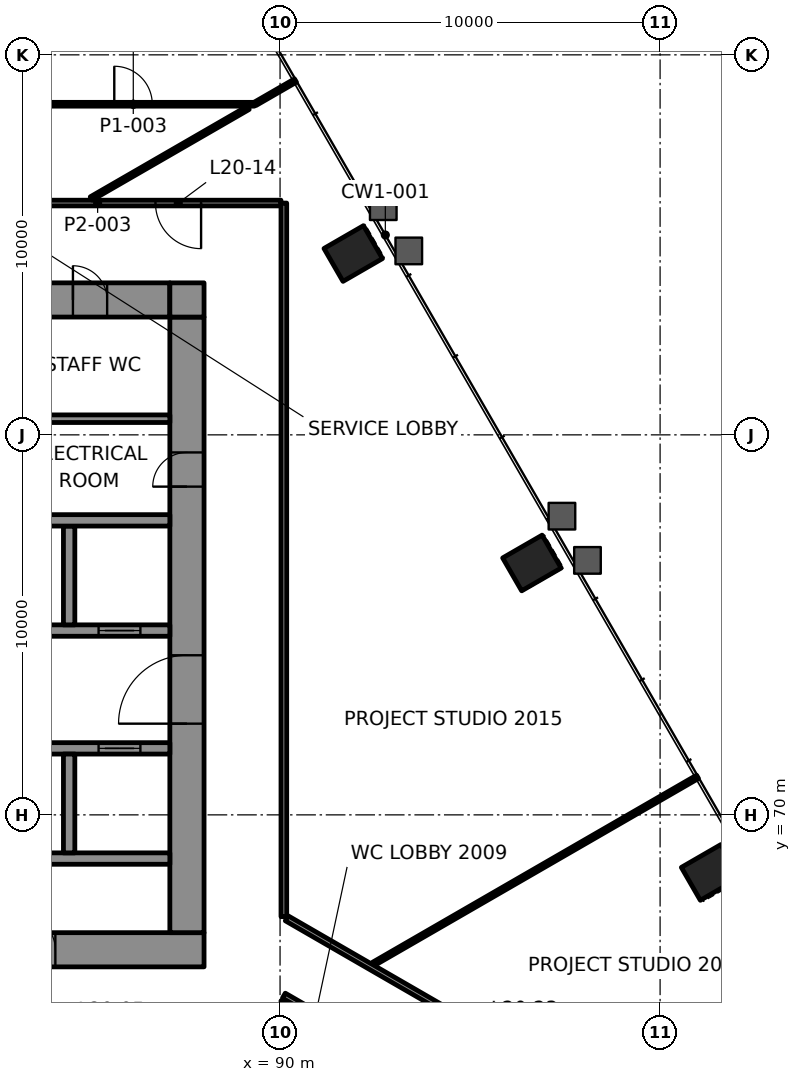
"""IFC4 building model, lengths in metres.
Left out: names, types, materials, properties, quantities, classifications, styles, units other than length and angle.
Written with IfcOpenShell. Run it as: python <this file> out.ifc"""

import sys

from ifc_helpers import new_model, si_unit, direction, frame, frame_2d, origin, origin_2d, place, context, subcontext, project, spatial, rectangle, extrude, element, fill, save


model = new_model("IFC4")
c1 = context("Model", 3, precision=1e-05, world=origin(), true_north=direction((0.0, 1.0)))
c2 = subcontext(c1, "Body", "Model", "MODEL_VIEW")
j1 = project(units=[si_unit("LENGTHUNIT", "METRE"), si_unit("PLANEANGLEUNIT", "RADIAN")], contexts=[c1])
p1 = place(None, origin())
s1 = spatial("IfcSite", under=j1, at=p1, CompositionType="ELEMENT")
p2 = place(p1, origin())
s2 = spatial("IfcBuilding", under=s1, at=p2, CompositionType="ELEMENT")
p3 = place(p2, frame((0.0, 0.0, 90.4)))
s3 = spatial("IfcBuildingStorey", under=s2, at=p3, CompositionType="ELEMENT", Elevation=90.4)
for number, where, z_axis, x_axis in (
    (1, (101.329, 68.485, -0.0), (0.0, 0.0, 1.0), (-0.5, 0.866, 0.0)),
    (2, (96.627, 76.628, -0.0), (0.0, 0.0, 1.0), (-0.5, 0.866, 0.0)),
    (3, (91.926, 84.772, -0.0), (0.0, 0.0, 1.0), (-0.5, 0.866, 0.0)),
):
    element("IfcColumn", number, at=place(p3, frame(where, z_axis=z_axis, x_axis=x_axis)), inside=s3, PredefinedType="COLUMN", context=c2, shape_type="SweptSolid", body=[
        extrude(rectangle(XDim=1.0, YDim=1.2, at=origin_2d()), origin(), (0.0, 0.0, 1.0), 4.2),
    ])
p4 = place(p3, frame((62.0, 66.45, 0.0), z_axis=(0.0, 0.0, 1.0), x_axis=(1.0, 0.0, 0.0)))
e4 = element("IfcWall", 4, at=p4, inside=s3, PredefinedType="SHEAR", context=c2, shape_type="SweptSolid", body=[
    extrude(rectangle(XDim=26.0, YDim=0.9, at=frame_2d((13.0, 0.0))), origin(), (0.0, 0.0, 1.0), 4.0),
])
p5 = place(p4, frame((3.45, 0.0, 0.0)))
e5 = element("IfcOpeningElement", 5, at=p5, cuts=e4, PredefinedType="OPENING", context=c2, shape_type="SweptSolid", body=[
    extrude(rectangle(XDim=0.9, YDim=2.1, at=frame_2d((0.45, 1.05))), frame((0.0, 0.46, 0.0), z_axis=(0.0, -1.0, 0.0), x_axis=(1.0, 0.0, 0.0)), (0.0, 0.0, 1.0), 0.92),
])
p6 = place(p4, frame((6.425, 0.0, 0.0)))
e6 = element("IfcOpeningElement", 6, at=p6, cuts=e4, PredefinedType="OPENING", context=c2, shape_type="SweptSolid", body=[
    extrude(rectangle(XDim=0.9, YDim=2.1, at=frame_2d((0.45, 1.05))), frame((0.0, 0.46, 0.0), z_axis=(0.0, -1.0, 0.0), x_axis=(1.0, 0.0, 0.0)), (0.0, 0.0, 1.0), 0.92),
])
p7 = place(p4, frame((9.4, 0.0, 0.0)))
e7 = element("IfcOpeningElement", 7, at=p7, cuts=e4, PredefinedType="OPENING", context=c2, shape_type="SweptSolid", body=[
    extrude(rectangle(XDim=0.9, YDim=2.1, at=frame_2d((0.45, 1.05))), frame((0.0, 0.46, 0.0), z_axis=(0.0, -1.0, 0.0), x_axis=(1.0, 0.0, 0.0)), (0.0, 0.0, 1.0), 0.92),
])
p8 = place(p4, frame((14.262, 0.0, 0.0)))
e8 = element("IfcOpeningElement", 8, at=p8, cuts=e4, PredefinedType="OPENING", context=c2, shape_type="SweptSolid", body=[
    extrude(rectangle(XDim=0.9, YDim=2.1, at=frame_2d((0.45, 1.05))), frame((0.0, 0.46, 0.0), z_axis=(0.0, -1.0, 0.0), x_axis=(1.0, 0.0, 0.0)), (0.0, 0.0, 1.0), 0.92),
])
p9 = place(p4, frame((21.188, 0.0, 0.0)))
e9 = element("IfcOpeningElement", 9, at=p9, cuts=e4, PredefinedType="OPENING", context=c2, shape_type="SweptSolid", body=[
    extrude(rectangle(XDim=0.9, YDim=2.1, at=frame_2d((0.45, 1.05))), frame((0.0, 0.46, 0.0), z_axis=(0.0, -1.0, 0.0), x_axis=(1.0, 0.0, 0.0)), (0.0, 0.0, 1.0), 0.92),
])
p10 = place(p3, frame((62.0, 83.55, 0.0), z_axis=(0.0, 0.0, 1.0), x_axis=(1.0, 0.0, 0.0)))
e10 = element("IfcWall", 10, at=p10, inside=s3, PredefinedType="SHEAR", context=c2, shape_type="SweptSolid", body=[
    extrude(rectangle(XDim=25.1, YDim=0.9, at=frame_2d((12.55, 0.0))), origin(), (0.0, 0.0, 1.0), 4.0),
])
p11 = place(p10, frame((5.695, 0.0, 0.0)))
e11 = element("IfcOpeningElement", 11, at=p11, cuts=e10, PredefinedType="OPENING", context=c2, shape_type="SweptSolid", body=[
    extrude(rectangle(XDim=1.0, YDim=2.1, at=frame_2d((0.5, 1.05))), frame((0.0, 0.46, 0.0), z_axis=(0.0, -1.0, 0.0), x_axis=(1.0, 0.0, 0.0)), (0.0, 0.0, 1.0), 0.92),
])
p12 = place(p10, frame((19.505, 0.0, 0.0)))
e12 = element("IfcOpeningElement", 12, at=p12, cuts=e10, PredefinedType="OPENING", context=c2, shape_type="SweptSolid", body=[
    extrude(rectangle(XDim=1.0, YDim=2.1, at=frame_2d((0.5, 1.05))), frame((0.0, 0.46, 0.0), z_axis=(0.0, -1.0, 0.0), x_axis=(1.0, 0.0, 0.0)), (0.0, 0.0, 1.0), 0.92),
])
p13 = place(p10, frame((3.45, 0.0, 0.0)))
e13 = element("IfcOpeningElement", 13, at=p13, cuts=e10, PredefinedType="OPENING", context=c2, shape_type="SweptSolid", body=[
    extrude(rectangle(XDim=0.9, YDim=2.1, at=frame_2d((0.45, 1.05))), frame((0.0, 0.46, 0.0), z_axis=(0.0, -1.0, 0.0), x_axis=(1.0, 0.0, 0.0)), (0.0, 0.0, 1.0), 0.92),
])
p14 = place(p10, frame((12.65, 0.0, 0.0)))
e14 = element("IfcOpeningElement", 14, at=p14, cuts=e10, PredefinedType="OPENING", context=c2, shape_type="SweptSolid", body=[
    extrude(rectangle(XDim=0.9, YDim=2.1, at=frame_2d((0.45, 1.05))), frame((0.0, 0.46, 0.0), z_axis=(0.0, -1.0, 0.0), x_axis=(1.0, 0.0, 0.0)), (0.0, 0.0, 1.0), 0.92),
])
p15 = place(p10, frame((22.55, 0.0, 0.0)))
e15 = element("IfcOpeningElement", 15, at=p15, cuts=e10, PredefinedType="OPENING", context=c2, shape_type="SweptSolid", body=[
    extrude(rectangle(XDim=0.9, YDim=2.1, at=frame_2d((0.45, 1.05))), frame((0.0, 0.46, 0.0), z_axis=(0.0, -1.0, 0.0), x_axis=(1.0, 0.0, 0.0)), (0.0, 0.0, 1.0), 0.92),
])
p16 = place(p3, frame((87.55, 66.9, 0.0), z_axis=(0.0, 0.0, 1.0), x_axis=(0.0, 1.0, 0.0)))
e16 = element("IfcWall", 16, at=p16, inside=s3, PredefinedType="SHEAR", context=c2, shape_type="SweptSolid", body=[
    extrude(rectangle(XDim=16.2, YDim=0.9, at=frame_2d((8.1, 0.0))), origin(), (0.0, 0.0, 1.0), 4.0),
])
p17 = place(p16, frame((5.5, 0.0, 0.0)))
e17 = element("IfcOpeningElement", 17, at=p17, cuts=e16, PredefinedType="OPENING", context=c2, shape_type="SweptSolid", body=[
    extrude(rectangle(XDim=1.8, YDim=2.1, at=frame_2d((0.9, 1.05))), frame((0.0, 0.46, 0.0), z_axis=(0.0, -1.0, 0.0), x_axis=(1.0, 0.0, 0.0)), (0.0, 0.0, 1.0), 0.92),
])
p18 = place(p16, frame((11.738, 0.0, 0.0)))
e18 = element("IfcOpeningElement", 18, at=p18, cuts=e16, PredefinedType="OPENING", context=c2, shape_type="SweptSolid", body=[
    extrude(rectangle(XDim=0.9, YDim=2.1, at=frame_2d((0.45, 1.05))), frame((0.0, 0.46, 0.0), z_axis=(0.0, -1.0, 0.0), x_axis=(1.0, 0.0, 0.0)), (0.0, 0.0, 1.0), 0.92),
])
p19 = place(p3, frame((70.35, 68.85, 0.0), z_axis=(0.0, 0.0, 1.0), x_axis=(1.0, 0.0, 0.0)))
e19 = element("IfcWall", 19, at=p19, inside=s3, PredefinedType="SHEAR", context=c2, shape_type="SweptSolid", body=[
    extrude(rectangle(XDim=16.75, YDim=0.3, at=frame_2d((8.375, 0.0))), origin(), (0.0, 0.0, 1.0), 4.0),
])
p20 = place(p3, frame((70.3, 71.75, 0.0), z_axis=(0.0, 0.0, 1.0), x_axis=(1.0, 0.0, 0.0)))
e20 = element("IfcWall", 20, at=p20, inside=s3, PredefinedType="SHEAR", context=c2, shape_type="SweptSolid", body=[
    extrude(rectangle(XDim=16.8, YDim=0.3, at=frame_2d((8.4, 0.0))), origin(), (0.0, 0.0, 1.0), 4.0),
])
p21 = place(p20, frame((1.0, 0.0, 0.0)))
e21 = element("IfcOpeningElement", 21, at=p21, cuts=e20, PredefinedType="OPENING", context=c2, shape_type="SweptSolid", body=[
    extrude(rectangle(XDim=1.1, YDim=2.1, at=frame_2d((0.55, 1.05))), frame((0.0, 0.16, 0.0), z_axis=(0.0, -1.0, 0.0), x_axis=(1.0, 0.0, 0.0)), (0.0, 0.0, 1.0), 0.32),
])
p22 = place(p20, frame((3.8, 0.0, 0.0)))
e22 = element("IfcOpeningElement", 22, at=p22, cuts=e20, PredefinedType="OPENING", context=c2, shape_type="SweptSolid", body=[
    extrude(rectangle(XDim=1.1, YDim=2.1, at=frame_2d((0.55, 1.05))), frame((0.0, 0.16, 0.0), z_axis=(0.0, -1.0, 0.0), x_axis=(1.0, 0.0, 0.0)), (0.0, 0.0, 1.0), 0.32),
])
p23 = place(p20, frame((6.6, 0.0, 0.0)))
e23 = element("IfcOpeningElement", 23, at=p23, cuts=e20, PredefinedType="OPENING", context=c2, shape_type="SweptSolid", body=[
    extrude(rectangle(XDim=1.1, YDim=2.1, at=frame_2d((0.55, 1.05))), frame((0.0, 0.16, 0.0), z_axis=(0.0, -1.0, 0.0), x_axis=(1.0, 0.0, 0.0)), (0.0, 0.0, 1.0), 0.32),
])
p24 = place(p20, frame((9.4, 0.0, 0.0)))
e24 = element("IfcOpeningElement", 24, at=p24, cuts=e20, PredefinedType="OPENING", context=c2, shape_type="SweptSolid", body=[
    extrude(rectangle(XDim=1.1, YDim=2.1, at=frame_2d((0.55, 1.05))), frame((0.0, 0.16, 0.0), z_axis=(0.0, -1.0, 0.0), x_axis=(1.0, 0.0, 0.0)), (0.0, 0.0, 1.0), 0.32),
])
p25 = place(p20, frame((12.2, 0.0, 0.0)))
e25 = element("IfcOpeningElement", 25, at=p25, cuts=e20, PredefinedType="OPENING", context=c2, shape_type="SweptSolid", body=[
    extrude(rectangle(XDim=1.1, YDim=2.1, at=frame_2d((0.55, 1.05))), frame((0.0, 0.16, 0.0), z_axis=(0.0, -1.0, 0.0), x_axis=(1.0, 0.0, 0.0)), (0.0, 0.0, 1.0), 0.32),
])
p26 = place(p20, frame((14.925, 0.0, 0.0)))
e26 = element("IfcOpeningElement", 26, at=p26, cuts=e20, PredefinedType="OPENING", context=c2, shape_type="SweptSolid", body=[
    extrude(rectangle(XDim=1.1, YDim=2.1, at=frame_2d((0.55, 1.05))), frame((0.0, 0.16, 0.0), z_axis=(0.0, -1.0, 0.0), x_axis=(1.0, 0.0, 0.0)), (0.0, 0.0, 1.0), 0.32),
])
p27 = place(p3, frame((70.3, 74.85, 0.0), z_axis=(0.0, 0.0, 1.0), x_axis=(1.0, 0.0, 0.0)))
e27 = element("IfcWall", 27, at=p27, inside=s3, PredefinedType="SHEAR", context=c2, shape_type="SweptSolid", body=[
    extrude(rectangle(XDim=16.8, YDim=0.3, at=frame_2d((8.4, 0.0))), origin(), (0.0, 0.0, 1.0), 4.0),
])
p28 = place(p27, frame((3.8, 0.0, 0.0)))
e28 = element("IfcOpeningElement", 28, at=p28, cuts=e27, PredefinedType="OPENING", context=c2, shape_type="SweptSolid", body=[
    extrude(rectangle(XDim=1.1, YDim=2.1, at=frame_2d((0.55, 1.05))), frame((0.0, 0.16, 0.0), z_axis=(0.0, -1.0, 0.0), x_axis=(1.0, 0.0, 0.0)), (0.0, 0.0, 1.0), 0.32),
])
p29 = place(p27, frame((12.2, 0.0, 0.0)))
e29 = element("IfcOpeningElement", 29, at=p29, cuts=e27, PredefinedType="OPENING", context=c2, shape_type="SweptSolid", body=[
    extrude(rectangle(XDim=1.1, YDim=2.1, at=frame_2d((0.55, 1.05))), frame((0.0, 0.16, 0.0), z_axis=(0.0, -1.0, 0.0), x_axis=(1.0, 0.0, 0.0)), (0.0, 0.0, 1.0), 0.32),
])
p30 = place(p27, frame((14.925, 0.0, 0.0)))
e30 = element("IfcOpeningElement", 30, at=p30, cuts=e27, PredefinedType="OPENING", context=c2, shape_type="SweptSolid", body=[
    extrude(rectangle(XDim=1.1, YDim=2.1, at=frame_2d((0.55, 1.05))), frame((0.0, 0.16, 0.0), z_axis=(0.0, -1.0, 0.0), x_axis=(1.0, 0.0, 0.0)), (0.0, 0.0, 1.0), 0.32),
])
for number, where, z_axis, x_axis in (
    (31, (84.45, 69.0, 0.0), (0.0, 0.0, 1.0), (0.0, 1.0, 0.0)),
    (32, (84.45, 75.0, 0.0), (0.0, 0.0, 1.0), (0.0, 1.0, 0.0)),
):
    element("IfcWall", number, at=place(p3, frame(where, z_axis=z_axis, x_axis=x_axis)), inside=s3, PredefinedType="SHEAR", context=c2, shape_type="SweptSolid", body=[
        extrude(rectangle(XDim=2.6, YDim=0.3, at=frame_2d((1.3, 0.0))), origin(), (0.0, 0.0, 1.0), 4.0),
    ])
p31 = place(p3, frame((64.35, 77.75, 0.0), z_axis=(0.0, 0.0, 1.0), x_axis=(1.0, 0.0, 0.0)))
e33 = element("IfcWall", 33, at=p31, inside=s3, PredefinedType="SHEAR", context=c2, shape_type="SweptSolid", body=[
    extrude(rectangle(XDim=22.75, YDim=0.3, at=frame_2d((11.375, 0.0))), origin(), (0.0, 0.0, 1.0), 4.0),
])
p32 = place(p31, frame((3.345, 0.0, 0.0)))
e34 = element("IfcOpeningElement", 34, at=p32, cuts=e33, PredefinedType="OPENING", context=c2, shape_type="SweptSolid", body=[
    extrude(rectangle(XDim=1.0, YDim=2.1, at=frame_2d((0.5, 1.05))), frame((0.0, 0.16, 0.0), z_axis=(0.0, -1.0, 0.0), x_axis=(1.0, 0.0, 0.0)), (0.0, 0.0, 1.0), 0.32),
])
p33 = place(p3, frame((87.1, 83.55, 0.0), z_axis=(0.0, 0.0, 1.0), x_axis=(1.0, 0.0, 0.0)))
e35 = element("IfcWall", 35, at=p33, inside=s3, PredefinedType="SHEAR", context=c2, shape_type="SweptSolid", body=[
    extrude(rectangle(XDim=0.9, YDim=0.9, at=frame_2d((0.45, 0.0))), origin(), (0.0, 0.0, 1.0), 4.0),
])
p34 = place(p3, frame((90.024, 86.1, 0.0), z_axis=(0.0, 0.0, 1.0), x_axis=(-1.0, 0.0, 0.0)))
e36 = element("IfcWall", 36, at=p34, inside=s3, PredefinedType="PARTITIONING", context=c2, shape_type="SweptSolid", body=[
    extrude(rectangle(XDim=9.649, YDim=0.15, at=frame_2d((4.825, 0.0))), origin(), (0.0, 0.0, 1.0), 3.4),
])
p35 = place(p34, frame((2.103, 0.0, 0.0)))
e37 = element("IfcOpeningElement", 37, at=p35, cuts=e36, PredefinedType="OPENING", context=c2, shape_type="SweptSolid", body=[
    extrude(rectangle(XDim=1.2, YDim=2.1, at=frame_2d((0.6, 1.05))), frame((0.0, 0.085, 0.0), z_axis=(0.0, -1.0, 0.0), x_axis=(1.0, 0.0, 0.0)), (0.0, 0.0, 1.0), 0.17),
])
p36 = place(p34, frame((6.823, 0.0, 0.0)))
e38 = element("IfcOpeningElement", 38, at=p36, cuts=e36, PredefinedType="OPENING", context=c2, shape_type="SweptSolid", body=[
    extrude(rectangle(XDim=1.0, YDim=2.1, at=frame_2d((0.5, 1.05))), frame((0.0, 0.085, 0.0), z_axis=(0.0, -1.0, 0.0), x_axis=(1.0, 0.0, 0.0)), (0.0, 0.0, 1.0), 0.17),
])
p37 = place(p3, frame((82.95, 88.7, 0.0), z_axis=(0.0, 0.0, 1.0), x_axis=(1.0, 0.0, 0.0)))
e39 = element("IfcWall", 39, at=p37, inside=s3, PredefinedType="PARTITIONING", context=c2, shape_type="SweptSolid", body=[
    extrude(rectangle(XDim=6.376, YDim=0.1, at=frame_2d((3.188, 0.0))), origin(), (0.0, 0.0, 1.0), 3.4),
])
p38 = place(p37, frame((2.688, 0.0, 0.0)))
e40 = element("IfcOpeningElement", 40, at=p38, cuts=e39, PredefinedType="OPENING", context=c2, shape_type="SweptSolid", body=[
    extrude(rectangle(XDim=1.0, YDim=2.1, at=frame_2d((0.5, 1.05))), frame((0.0, 0.06, 0.0), z_axis=(0.0, -1.0, 0.0), x_axis=(1.0, 0.0, 0.0)), (0.0, 0.0, 1.0), 0.12),
])
p39 = place(p3, frame((92.457, 66.077, 0.0), z_axis=(0.0, 0.0, 1.0), x_axis=(0.866029936849, 0.499992148419, 0.0)))
e41 = element("IfcWall", 41, at=p39, inside=s3, PredefinedType="PARTITIONING", context=c2, shape_type="SweptSolid", body=[
    extrude(rectangle(XDim=9.847, YDim=0.1, at=frame_2d((4.924, 0.0))), origin(), (0.0, 0.0, 1.0), 3.165),
])
p40 = place(p3, frame((85.03, 86.22, 0.0), z_axis=(0.0, 0.0, 1.0), x_axis=(0.86602800421, 0.499995495904, 0.0)))
e42 = element("IfcWall", 42, at=p40, inside=s3, PredefinedType="PARTITIONING", context=c2, shape_type="SweptSolid", body=[
    extrude(rectangle(XDim=4.773, YDim=0.1, at=frame_2d((2.386, 0.0))), origin(), (0.0, 0.0, 1.0), 3.4),
])
p41 = place(p3, frame((90.1, 63.975, 0.0), z_axis=(0.0, 0.0, 1.0), x_axis=(0.0, 1.0, 0.0)))
e43 = element("IfcWall", 43, at=p41, inside=s3, PredefinedType="PARTITIONING", context=c2, shape_type="SweptSolid", body=[
    extrude(rectangle(XDim=1.131, YDim=0.15, at=frame_2d((0.565, 0.0))), origin(), (0.0, 0.0, 1.0), 3.247),
])
p42 = place(p3, frame((90.1, 67.321, 0.0), z_axis=(0.0, 0.0, 1.0), x_axis=(0.0, 1.0, 0.0)))
e44 = element("IfcWall", 44, at=p42, inside=s3, PredefinedType="PARTITIONING", context=c2, shape_type="SweptSolid", body=[
    extrude(rectangle(XDim=18.778, YDim=0.15, at=frame_2d((9.389, 0.0))), origin(), (0.0, 0.0, 1.0), 3.4),
])
p43 = place(p3, frame((90.175, 67.278, 0.0), z_axis=(0.0, 0.0, 1.0), x_axis=(0.866020657332, -0.500008221008, 0.0)))
e45 = element("IfcWall", 45, at=p43, inside=s3, PredefinedType="PARTITIONING", context=c2, shape_type="SweptSolid", body=[
    extrude(rectangle(XDim=14.15, YDim=0.15, at=frame_2d((7.075, 0.0))), origin(), (0.0, 0.0, 1.0), 3.4),
])
p44 = place(p43, frame((7.782, 0.0, 0.0)))
e46 = element("IfcOpeningElement", 46, at=p44, cuts=e45, PredefinedType="OPENING", context=c2, shape_type="SweptSolid", body=[
    extrude(rectangle(XDim=0.9, YDim=2.1, at=frame_2d((0.45, 1.05))), frame((0.0, 0.085, 0.0), z_axis=(0.0, -1.0, 0.0), x_axis=(1.0, 0.0, 0.0)), (0.0, 0.0, 1.0), 0.17),
])
p45 = place(p3, frame((101.529, 58.645, 0.0), z_axis=(0.0, 0.0, 1.0), x_axis=(-0.866020144196, 0.500009109764, 0.0)))
e47 = element("IfcWall", 47, at=p45, inside=s3, PredefinedType="PARTITIONING", context=c2, shape_type="SweptSolid", body=[
    extrude(rectangle(XDim=13.197, YDim=0.15, at=frame_2d((6.598, 0.0))), origin(), (0.0, 0.0, 1.0), 3.247),
])
p46 = place(p45, frame((5.467, 0.0, 0.0)))
e48 = element("IfcOpeningElement", 48, at=p46, cuts=e47, PredefinedType="OPENING", context=c2, shape_type="SweptSolid", body=[
    extrude(rectangle(XDim=0.9, YDim=2.1, at=frame_2d((0.45, 1.05))), frame((0.0, 0.085, 0.0), z_axis=(0.0, -1.0, 0.0), x_axis=(1.0, 0.0, 0.0)), (0.0, 0.0, 1.0), 0.17),
])
p47 = place(p3, frame((89.347, 88.713, 0.0), z_axis=(0.0, 0.0, 1.0), x_axis=(0.866109108303, 0.499854991488, 0.0)))
e49 = element("IfcWall", 49, at=p47, inside=s3, PredefinedType="PARTITIONING", context=c2, shape_type="SweptSolid", body=[
    extrude(rectangle(XDim=1.222, YDim=0.1, at=frame_2d((0.611, 0.0))), origin(), (0.0, 0.0, 1.0), 3.165),
])
p48 = place(p3, frame((83.05, 80.425, 0.0), z_axis=(0.0, 0.0, 1.0), x_axis=(1.0, 0.0, 0.0)))
e50 = element("IfcWall", 50, at=p48, inside=s3, PredefinedType="PARTITIONING", context=c2, shape_type="SweptSolid", body=[
    extrude(rectangle(XDim=4.05, YDim=0.2, at=frame_2d((2.025, 0.0))), origin(), (0.0, 0.0, 1.0), 4.0),
])
p49 = place(p35, origin())
e51 = element("IfcDoor", 51, at=p49, inside=s3, OperationType="DOUBLE_DOOR_SINGLE_SWING", PredefinedType="DOOR", context=c2, shape_type="SweptSolid", body=[
    extrude(rectangle(XDim=1.2, YDim=2.1, at=frame_2d((0.6, 1.05))), frame((0.0, 0.025, 0.0), z_axis=(0.0, -1.0, 0.0), x_axis=(1.0, 0.0, 0.0)), (0.0, 0.0, 1.0), 0.05),
])
fill(e37, e51)
p50 = place(p38, origin())
e52 = element("IfcDoor", 52, at=p50, inside=s3, OperationType="SINGLE_SWING_LEFT", PredefinedType="DOOR", context=c2, shape_type="SweptSolid", body=[
    extrude(rectangle(XDim=1.0, YDim=2.1, at=frame_2d((0.5, 1.05))), frame((0.0, 0.025, 0.0), z_axis=(0.0, -1.0, 0.0), x_axis=(1.0, 0.0, 0.0)), (0.0, 0.0, 1.0), 0.05),
])
fill(e40, e52)
p51 = place(p26, origin())
e53 = element("IfcDoor", 53, at=p51, inside=s3, OperationType="DOUBLE_DOOR_SLIDING", PredefinedType="DOOR", context=c2, shape_type="SweptSolid", body=[
    extrude(rectangle(XDim=1.1, YDim=2.1, at=frame_2d((0.55, 1.05))), frame((0.0, 0.025, 0.0), z_axis=(0.0, -1.0, 0.0), x_axis=(1.0, 0.0, 0.0)), (0.0, 0.0, 1.0), 0.05),
])
fill(e26, e53)
p52 = place(p30, origin())
e54 = element("IfcDoor", 54, at=p52, inside=s3, OperationType="DOUBLE_DOOR_SLIDING", PredefinedType="DOOR", context=c2, shape_type="SweptSolid", body=[
    extrude(rectangle(XDim=1.1, YDim=2.1, at=frame_2d((0.55, 1.05))), frame((0.0, 0.025, 0.0), z_axis=(0.0, -1.0, 0.0), x_axis=(1.0, 0.0, 0.0)), (0.0, 0.0, 1.0), 0.05),
])
fill(e30, e54)
p53 = place(p17, origin())
e55 = element("IfcDoor", 55, at=p53, inside=s3, OperationType="SINGLE_SWING_RIGHT", PredefinedType="DOOR", context=c2, shape_type="SweptSolid", body=[
    extrude(rectangle(XDim=1.8, YDim=2.1, at=frame_2d((0.9, 1.05))), frame((0.0, 0.17, 0.0), z_axis=(0.0, -1.0, 0.0), x_axis=(1.0, 0.0, 0.0)), (0.0, 0.0, 1.0), 0.34),
])
fill(e17, e55)
p54 = place(p9, origin())
e56 = element("IfcDoor", 56, at=p54, inside=s3, OperationType="SINGLE_SWING_LEFT", PredefinedType="DOOR", context=c2, shape_type="SweptSolid", body=[
    extrude(rectangle(XDim=0.9, YDim=2.1, at=frame_2d((0.45, 1.05))), frame((0.0, 0.17, 0.0), z_axis=(0.0, -1.0, 0.0), x_axis=(1.0, 0.0, 0.0)), (0.0, 0.0, 1.0), 0.34),
])
fill(e9, e56)
p55 = place(p18, origin())
e57 = element("IfcDoor", 57, at=p55, inside=s3, OperationType="SINGLE_SWING_RIGHT", PredefinedType="DOOR", context=c2, shape_type="SweptSolid", body=[
    extrude(rectangle(XDim=0.9, YDim=2.1, at=frame_2d((0.45, 1.05))), frame((0.0, 0.17, 0.0), z_axis=(0.0, -1.0, 0.0), x_axis=(1.0, 0.0, 0.0)), (0.0, 0.0, 1.0), 0.34),
])
fill(e18, e57)
p56 = place(p15, origin())
e58 = element("IfcDoor", 58, at=p56, inside=s3, OperationType="SINGLE_SWING_LEFT", PredefinedType="DOOR", context=c2, shape_type="SweptSolid", body=[
    extrude(rectangle(XDim=0.9, YDim=2.1, at=frame_2d((0.45, 1.05))), frame((0.0, 0.17, 0.0), z_axis=(0.0, -1.0, 0.0), x_axis=(1.0, 0.0, 0.0)), (0.0, 0.0, 1.0), 0.34),
])
fill(e15, e58)
save(model, sys.argv[1])
